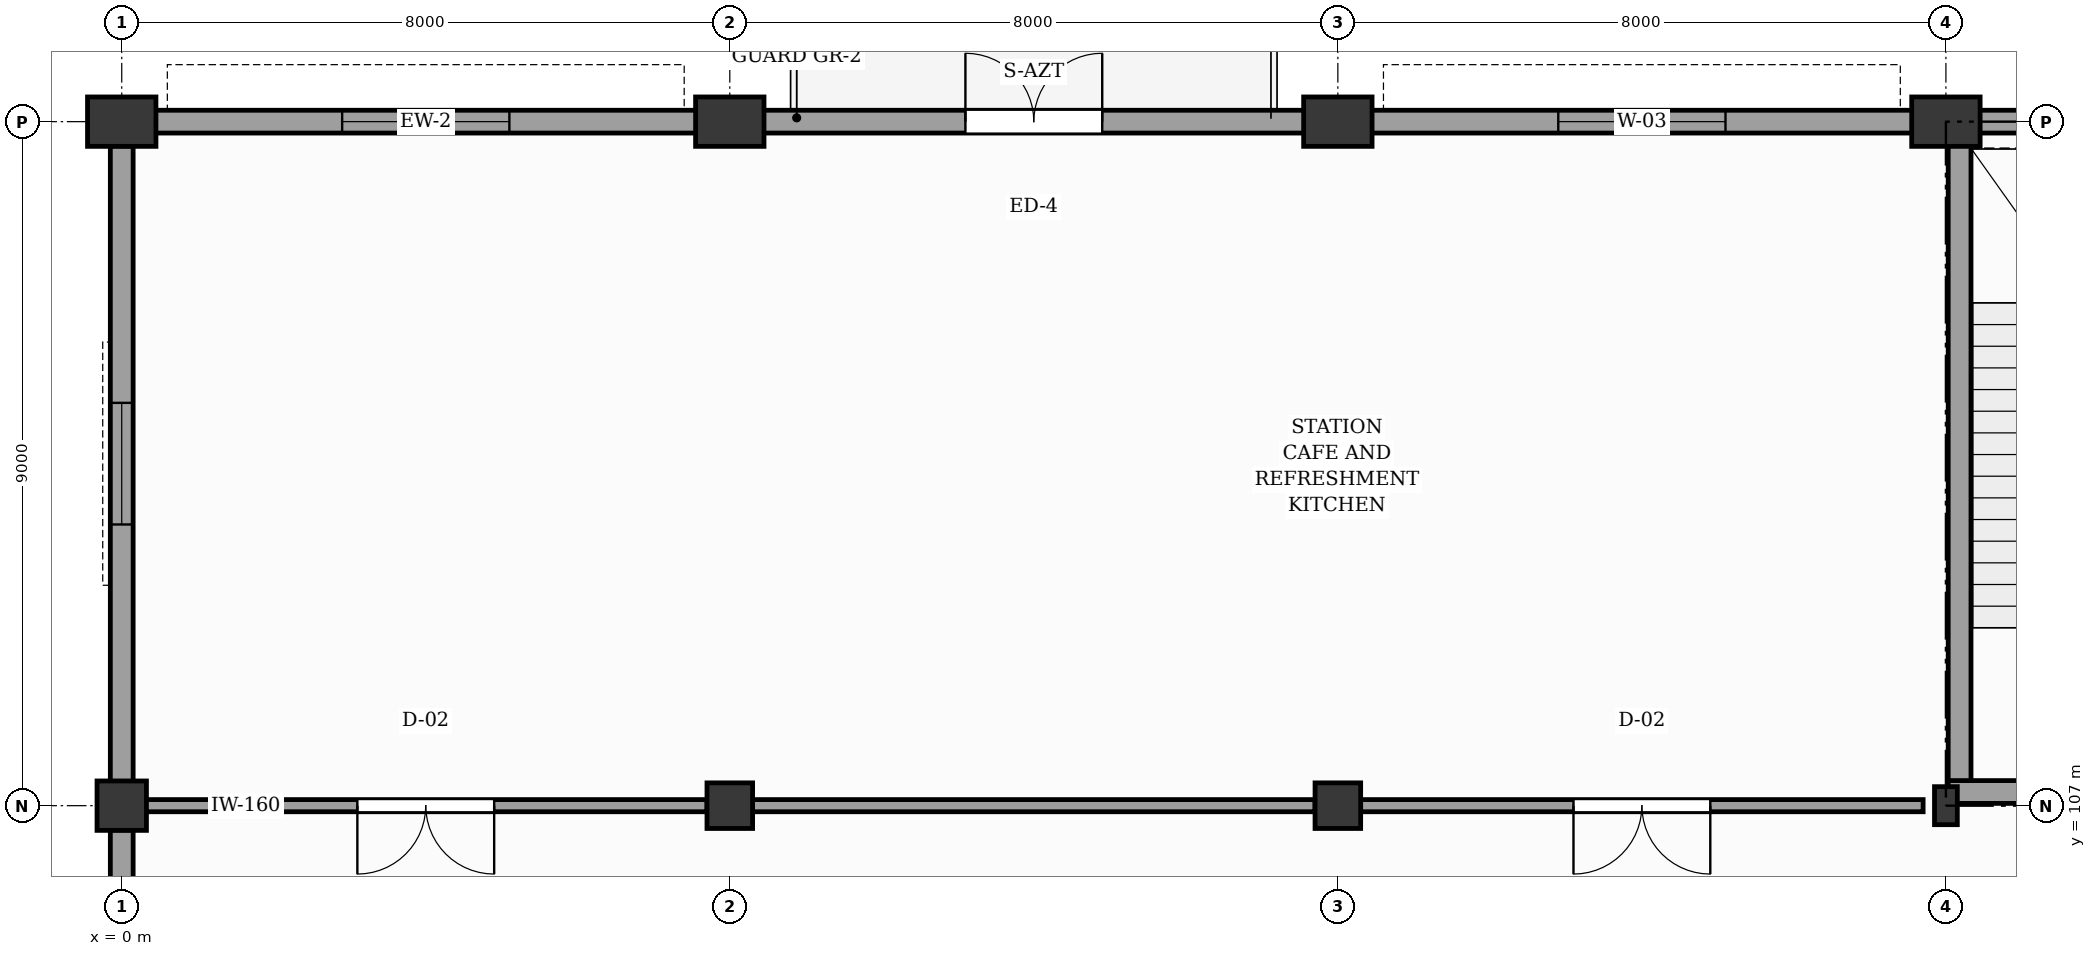
"""IFC4 building model, lengths in metres.
Left out: names, types, materials, properties, quantities, classifications, styles, units other than length and angle.
Written with IfcOpenShell. Run it as: python <this file> out.ifc"""

import sys

from ifc_helpers import new_model, si_unit, direction, frame, frame_2d, origin, origin_2d, place, context, subcontext, project, spatial, rectangle, i_section, extrude, element, fill, save


model = new_model("IFC4")
c1 = context("Model", 3, precision=1e-05, world=origin(), true_north=direction((0.0, 1.0)))
c2 = subcontext(c1, "Body", "Model", "MODEL_VIEW")
j1 = project(units=[si_unit("LENGTHUNIT", "METRE"), si_unit("PLANEANGLEUNIT", "RADIAN")], contexts=[c1])
p1 = place(None, origin())
s1 = spatial("IfcSite", under=j1, at=p1, CompositionType="ELEMENT")
p2 = place(p1, origin())
s2 = spatial("IfcBuilding", under=s1, at=p2, CompositionType="ELEMENT")
p3 = place(p2, frame((0.0, 0.0, 4.8)))
s3 = spatial("IfcBuildingStorey", under=s2, at=p3, CompositionType="ELEMENT", Elevation=4.8)
p4 = place(p3, frame((0.0, 107.0, 0.0), z_axis=(0.0, 0.0, 1.0), x_axis=(1.0, 0.0, 0.0)))
e1 = element("IfcColumn", 1, at=p4, inside=s3, PredefinedType="COLUMN", context=c2, shape_type="SweptSolid", body=[
    extrude(rectangle(XDim=0.65, YDim=0.65, at=origin_2d()), origin(), (0.0, 0.0, 1.0), 4.8),
])
p5 = place(p3, frame((0.0, 116.0, 0.0), z_axis=(0.0, 0.0, 1.0), x_axis=(1.0, 0.0, 0.0)))
e2 = element("IfcColumn", 2, at=p5, inside=s3, PredefinedType="PILASTER", context=c2, shape_type="SweptSolid", body=[
    extrude(rectangle(XDim=0.9, YDim=0.65, at=origin_2d()), origin(), (0.0, 0.0, 1.0), 4.8),
])
p6 = place(p3, frame((8.0, 107.0, 0.0), z_axis=(0.0, 0.0, 1.0), x_axis=(1.0, 0.0, 0.0)))
e3 = element("IfcColumn", 3, at=p6, inside=s3, PredefinedType="COLUMN", context=c2, shape_type="SweptSolid", body=[
    extrude(rectangle(XDim=0.6, YDim=0.6, at=origin_2d()), origin(), (0.0, 0.0, 1.0), 4.8),
])
p7 = place(p3, frame((8.0, 116.0, 0.0), z_axis=(0.0, 0.0, 1.0), x_axis=(1.0, 0.0, 0.0)))
e4 = element("IfcColumn", 4, at=p7, inside=s3, PredefinedType="PILASTER", context=c2, shape_type="SweptSolid", body=[
    extrude(rectangle(XDim=0.9, YDim=0.65, at=origin_2d()), origin(), (0.0, 0.0, 1.0), 4.8),
])
p8 = place(p3, frame((16.0, 107.0, 0.0), z_axis=(0.0, 0.0, 1.0), x_axis=(1.0, 0.0, 0.0)))
e5 = element("IfcColumn", 5, at=p8, inside=s3, PredefinedType="COLUMN", context=c2, shape_type="SweptSolid", body=[
    extrude(rectangle(XDim=0.6, YDim=0.6, at=origin_2d()), origin(), (0.0, 0.0, 1.0), 4.8),
])
p9 = place(p3, frame((16.0, 116.0, 0.0), z_axis=(0.0, 0.0, 1.0), x_axis=(1.0, 0.0, 0.0)))
e6 = element("IfcColumn", 6, at=p9, inside=s3, PredefinedType="PILASTER", context=c2, shape_type="SweptSolid", body=[
    extrude(rectangle(XDim=0.9, YDim=0.65, at=origin_2d()), origin(), (0.0, 0.0, 1.0), 4.8),
])
p10 = place(p3, frame((24.0, 107.0, 0.0), z_axis=(0.0, 0.0, 1.0), x_axis=(1.0, 0.0, 0.0)))
e7 = element("IfcColumn", 7, at=p10, inside=s3, PredefinedType="COLUMN", context=c2, shape_type="SweptSolid", body=[
    extrude(i_section(OverallWidth=0.3, OverallDepth=0.5, WebThickness=0.014, FlangeThickness=0.028, FilletRadius=0.027, at=origin_2d()), origin(), (0.0, 0.0, 1.0), 4.8),
])
p11 = place(p3, frame((24.0, 116.0, 0.0), z_axis=(0.0, 0.0, 1.0), x_axis=(1.0, 0.0, 0.0)))
e8 = element("IfcColumn", 8, at=p11, inside=s3, PredefinedType="PILASTER", context=c2, shape_type="SweptSolid", body=[
    extrude(rectangle(XDim=0.9, YDim=0.65, at=origin_2d()), origin(), (0.0, 0.0, 1.0), 4.8),
])
p12 = place(p3, frame((0.4, 116.0, 0.0), z_axis=(0.0, 0.0, 1.0), x_axis=(1.0, 0.0, 0.0)))
e9 = element("IfcWall", 9, at=p12, inside=s3, PredefinedType="SOLIDWALL", context=c2, shape_type="SweptSolid", body=[
    extrude(rectangle(XDim=7.2, YDim=0.3, at=frame_2d((3.6, 0.0))), origin(), (0.0, 0.0, 1.0), 3.84),
])
p13 = place(p12, frame((2.5, 0.0, 0.9)))
e10 = element("IfcOpeningElement", 10, at=p13, cuts=e9, PredefinedType="OPENING", context=c2, shape_type="SweptSolid", body=[
    extrude(rectangle(XDim=2.2, YDim=2.2, at=frame_2d((1.1, 1.1))), frame((0.0, 0.16, 0.0), z_axis=(0.0, -1.0, 0.0), x_axis=(1.0, 0.0, 0.0)), (0.0, 0.0, 1.0), 0.32),
])
p14 = place(p3, frame((8.4, 116.0, 0.0), z_axis=(0.0, 0.0, 1.0), x_axis=(1.0, 0.0, 0.0)))
e11 = element("IfcWall", 11, at=p14, inside=s3, PredefinedType="SOLIDWALL", context=c2, shape_type="SweptSolid", body=[
    extrude(rectangle(XDim=7.2, YDim=0.3, at=frame_2d((3.6, 0.0))), origin(), (0.0, 0.0, 1.0), 3.84),
])
p15 = place(p14, frame((2.7, 0.0, 0.0)))
e12 = element("IfcOpeningElement", 12, at=p15, cuts=e11, PredefinedType="OPENING", context=c2, shape_type="SweptSolid", body=[
    extrude(rectangle(XDim=1.8, YDim=2.2, at=frame_2d((0.9, 1.1))), frame((0.0, 0.16, 0.0), z_axis=(0.0, -1.0, 0.0), x_axis=(1.0, 0.0, 0.0)), (0.0, 0.0, 1.0), 0.32),
])
p16 = place(p3, frame((16.4, 116.0, 0.0), z_axis=(0.0, 0.0, 1.0), x_axis=(1.0, 0.0, 0.0)))
e13 = element("IfcWall", 13, at=p16, inside=s3, PredefinedType="SOLIDWALL", context=c2, shape_type="SweptSolid", body=[
    extrude(rectangle(XDim=7.2, YDim=0.3, at=frame_2d((3.6, 0.0))), origin(), (0.0, 0.0, 1.0), 3.84),
])
p17 = place(p16, frame((2.5, 0.0, 0.9)))
e14 = element("IfcOpeningElement", 14, at=p17, cuts=e13, PredefinedType="OPENING", context=c2, shape_type="SweptSolid", body=[
    extrude(rectangle(XDim=2.2, YDim=2.2, at=frame_2d((1.1, 1.1))), frame((0.0, 0.16, 0.0), z_axis=(0.0, -1.0, 0.0), x_axis=(1.0, 0.0, 0.0)), (0.0, 0.0, 1.0), 0.32),
])
p18 = place(p3, frame((24.4, 116.0, 0.0), z_axis=(0.0, 0.0, 1.0), x_axis=(1.0, 0.0, 0.0)))
e15 = element("IfcWall", 15, at=p18, inside=s3, PredefinedType="SOLIDWALL", context=c2, shape_type="SweptSolid", body=[
    extrude(rectangle(XDim=7.2, YDim=0.3, at=frame_2d((3.6, 0.0))), origin(), (0.0, 0.0, 1.0), 3.84),
])
p19 = place(p3, frame((0.0, 98.32, 0.0), z_axis=(0.0, 0.0, 1.0), x_axis=(0.0, 1.0, 0.0)))
e16 = element("IfcWall", 16, at=p19, inside=s3, PredefinedType="SOLIDWALL", context=c2, shape_type="SweptSolid", body=[
    extrude(rectangle(XDim=8.36, YDim=0.3, at=frame_2d((4.18, 0.0))), origin(), (0.0, 0.0, 1.0), 3.71),
])
p20 = place(p19, frame((3.38, 0.0, 0.95)))
e17 = element("IfcOpeningElement", 17, at=p20, cuts=e16, PredefinedType="OPENING", context=c2, shape_type="SweptSolid", body=[
    extrude(rectangle(XDim=1.6, YDim=2.1, at=frame_2d((0.8, 1.05))), frame((0.0, 0.16, 0.0), z_axis=(0.0, -1.0, 0.0), x_axis=(1.0, 0.0, 0.0)), (0.0, 0.0, 1.0), 0.32),
])
p21 = place(p3, frame((0.0, 107.32, 0.0), z_axis=(0.0, 0.0, 1.0), x_axis=(0.0, 1.0, 0.0)))
e18 = element("IfcWall", 18, at=p21, inside=s3, PredefinedType="SOLIDWALL", context=c2, shape_type="SweptSolid", body=[
    extrude(rectangle(XDim=8.36, YDim=0.3, at=frame_2d((4.18, 0.0))), origin(), (0.0, 0.0, 1.0), 3.81),
])
p22 = place(p21, frame((3.38, 0.0, 0.95)))
e19 = element("IfcOpeningElement", 19, at=p22, cuts=e18, PredefinedType="OPENING", context=c2, shape_type="SweptSolid", body=[
    extrude(rectangle(XDim=1.6, YDim=2.1, at=frame_2d((0.8, 1.05))), frame((0.0, 0.16, 0.0), z_axis=(0.0, -1.0, 0.0), x_axis=(1.0, 0.0, 0.0)), (0.0, 0.0, 1.0), 0.32),
])
p23 = place(p3, frame((24.18, 107.18, 0.0), z_axis=(0.0, 0.0, 1.0), x_axis=(0.0, 1.0, 0.0)))
e20 = element("IfcWall", 20, at=p23, inside=s3, PredefinedType="SHEAR", context=c2, shape_type="SweptSolid", body=[
    extrude(rectangle(XDim=8.64, YDim=0.3, at=frame_2d((4.32, 0.0))), origin(), (0.0, 0.0, 1.0), 4.52),
])
p24 = place(p3, frame((24.03, 107.18, 0.0), z_axis=(0.0, 0.0, 1.0), x_axis=(1.0, 0.0, 0.0)))
e21 = element("IfcWall", 21, at=p24, inside=s3, PredefinedType="SHEAR", context=c2, shape_type="SweptSolid", body=[
    extrude(rectangle(XDim=7.94, YDim=0.3, at=frame_2d((3.97, 0.0))), origin(), (0.0, 0.0, 1.0), 4.52),
])
p25 = place(p24, frame((5.35, 0.0, 0.0)))
e22 = element("IfcOpeningElement", 22, at=p25, cuts=e21, PredefinedType="OPENING", context=c2, shape_type="SweptSolid", body=[
    extrude(rectangle(XDim=1.6, YDim=2.15, at=frame_2d((0.8, 1.075))), frame((0.0, 0.16, 0.0), z_axis=(0.0, -1.0, 0.0), x_axis=(1.0, 0.0, 0.0)), (0.0, 0.0, 1.0), 0.32),
])
p26 = place(p3, frame((0.3, 107.0, 0.0), z_axis=(0.0, 0.0, 1.0), x_axis=(1.0, 0.0, 0.0)))
e23 = element("IfcWall", 23, at=p26, inside=s3, PredefinedType="PARTITIONING", context=c2, shape_type="SweptSolid", body=[
    extrude(rectangle(XDim=7.4, YDim=0.16, at=frame_2d((3.7, 0.0))), origin(), (0.0, 0.0, 1.0), 3.7),
])
p27 = place(p26, frame((2.8, 0.0, 0.0)))
e24 = element("IfcOpeningElement", 24, at=p27, cuts=e23, PredefinedType="OPENING", context=c2, shape_type="SweptSolid", body=[
    extrude(rectangle(XDim=1.8, YDim=2.25, at=frame_2d((0.9, 1.125))), frame((0.0, 0.09, 0.0), z_axis=(0.0, -1.0, 0.0), x_axis=(1.0, 0.0, 0.0)), (0.0, 0.0, 1.0), 0.18),
])
p28 = place(p3, frame((8.3, 107.0, 0.0), z_axis=(0.0, 0.0, 1.0), x_axis=(1.0, 0.0, 0.0)))
e25 = element("IfcWall", 25, at=p28, inside=s3, PredefinedType="PARTITIONING", context=c2, shape_type="SweptSolid", body=[
    extrude(rectangle(XDim=7.4, YDim=0.16, at=frame_2d((3.7, 0.0))), origin(), (0.0, 0.0, 1.0), 3.7),
])
p29 = place(p3, frame((16.3, 107.0, 0.0), z_axis=(0.0, 0.0, 1.0), x_axis=(1.0, 0.0, 0.0)))
e26 = element("IfcWall", 26, at=p29, inside=s3, PredefinedType="PARTITIONING", context=c2, shape_type="SweptSolid", body=[
    extrude(rectangle(XDim=7.4, YDim=0.16, at=frame_2d((3.7, 0.0))), origin(), (0.0, 0.0, 1.0), 3.7),
])
p30 = place(p29, frame((2.8, 0.0, 0.0)))
e27 = element("IfcOpeningElement", 27, at=p30, cuts=e26, PredefinedType="OPENING", context=c2, shape_type="SweptSolid", body=[
    extrude(rectangle(XDim=1.8, YDim=2.25, at=frame_2d((0.9, 1.125))), frame((0.0, 0.09, 0.0), z_axis=(0.0, -1.0, 0.0), x_axis=(1.0, 0.0, 0.0)), (0.0, 0.0, 1.0), 0.18),
])
p31 = place(p13, origin())
e28 = element("IfcWindow", 28, at=p31, inside=s3, PartitioningType="SINGLE_PANEL", PredefinedType="WINDOW", context=c2, shape_type="SweptSolid", body=[
    extrude(rectangle(XDim=2.2, YDim=2.2, at=frame_2d((1.1, 1.1))), frame((0.0, 0.03, 0.0), z_axis=(0.0, -1.0, 0.0), x_axis=(1.0, 0.0, 0.0)), (0.0, 0.0, 1.0), 0.06),
])
fill(e10, e28)
p32 = place(p15, origin())
e29 = element("IfcDoor", 29, at=p32, inside=s3, OperationType="DOUBLE_DOOR_SINGLE_SWING", PredefinedType="DOOR", context=c2, shape_type="SweptSolid", body=[
    extrude(rectangle(XDim=1.8, YDim=2.2, at=frame_2d((0.9, 1.1))), frame((0.0, 0.025, 0.0), z_axis=(0.0, -1.0, 0.0), x_axis=(1.0, 0.0, 0.0)), (0.0, 0.0, 1.0), 0.05),
])
fill(e12, e29)
p33 = place(p17, origin())
e30 = element("IfcWindow", 30, at=p33, inside=s3, PartitioningType="SINGLE_PANEL", PredefinedType="WINDOW", context=c2, shape_type="SweptSolid", body=[
    extrude(rectangle(XDim=2.2, YDim=2.2, at=frame_2d((1.1, 1.1))), frame((0.0, 0.03, 0.0), z_axis=(0.0, -1.0, 0.0), x_axis=(1.0, 0.0, 0.0)), (0.0, 0.0, 1.0), 0.06),
])
fill(e14, e30)
p34 = place(p22, origin())
e31 = element("IfcWindow", 31, at=p34, inside=s3, PartitioningType="SINGLE_PANEL", PredefinedType="WINDOW", context=c2, shape_type="SweptSolid", body=[
    extrude(rectangle(XDim=1.6, YDim=2.1, at=frame_2d((0.8, 1.05))), frame((0.0, 0.03, 0.0), z_axis=(0.0, -1.0, 0.0), x_axis=(1.0, 0.0, 0.0)), (0.0, 0.0, 1.0), 0.06),
])
fill(e19, e31)
p35 = place(p27, frame((1.8, 0.0, 0.0), z_axis=(0.0, 0.0, 1.0), x_axis=(-1.0, 0.0, 0.0)))
e32 = element("IfcDoor", 32, at=p35, inside=s3, OperationType="DOUBLE_DOOR_SINGLE_SWING", PredefinedType="DOOR", context=c2, shape_type="SweptSolid", body=[
    extrude(rectangle(XDim=1.8, YDim=2.25, at=frame_2d((0.9, 1.125))), frame((0.0, 0.025, 0.0), z_axis=(0.0, -1.0, 0.0), x_axis=(1.0, 0.0, 0.0)), (0.0, 0.0, 1.0), 0.05),
])
fill(e24, e32)
p36 = place(p30, frame((1.8, 0.0, 0.0), z_axis=(0.0, 0.0, 1.0), x_axis=(-1.0, 0.0, 0.0)))
e33 = element("IfcDoor", 33, at=p36, inside=s3, OperationType="DOUBLE_DOOR_SINGLE_SWING", PredefinedType="DOOR", context=c2, shape_type="SweptSolid", body=[
    extrude(rectangle(XDim=1.8, YDim=2.25, at=frame_2d((0.9, 1.125))), frame((0.0, 0.025, 0.0), z_axis=(0.0, -1.0, 0.0), x_axis=(1.0, 0.0, 0.0)), (0.0, 0.0, 1.0), 0.05),
])
fill(e27, e33)
save(model, sys.argv[1])
